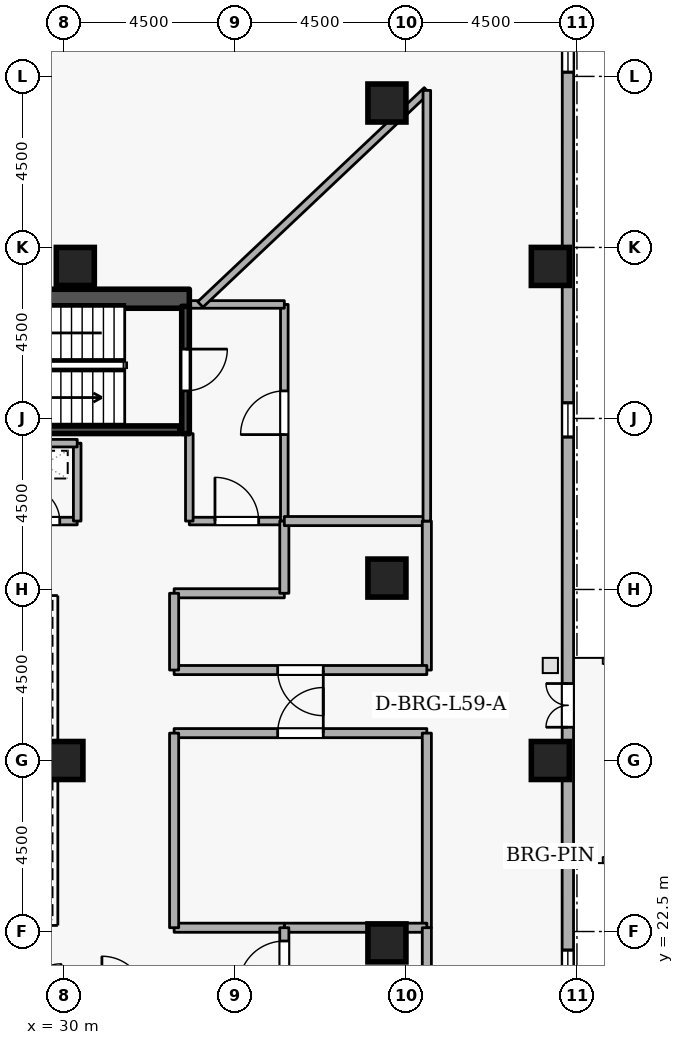
"""IFC4 building model, lengths in metres.
Left out: names, types, materials, properties, quantities, classifications, styles, units other than length and angle.
Written with IfcOpenShell. Run it as: python <this file> out.ifc"""

import sys

from ifc_helpers import new_model, si_unit, direction, frame, frame_2d, origin, origin_2d, place, context, subcontext, project, spatial, rectangle, extrude, element, fill, save


model = new_model("IFC4")
c1 = context("Model", 3, precision=1e-05, world=origin(), true_north=direction((0.0, 1.0)))
c2 = subcontext(c1, "Body", "Model", "MODEL_VIEW")
j1 = project(units=[si_unit("LENGTHUNIT", "METRE"), si_unit("PLANEANGLEUNIT", "RADIAN")], contexts=[c1])
p1 = place(None, origin())
s1 = spatial("IfcSite", under=j1, at=p1, CompositionType="ELEMENT")
p2 = place(p1, origin())
s2 = spatial("IfcBuilding", under=s1, at=p2, CompositionType="ELEMENT")
p3 = place(p2, frame((0.0, 0.0, 221.7)))
s3 = spatial("IfcBuildingStorey", under=s2, at=p3, CompositionType="ELEMENT", Elevation=221.7)
p4 = place(p3, frame((17.7, 39.15, 0.0), z_axis=(0.0, 0.0, 1.0), x_axis=(1.0, 0.0, 0.0)))
e1 = element("IfcWall", 1, at=p4, inside=s3, PredefinedType="SHEAR", context=c2, shape_type="SweptSolid", body=[
    extrude(rectangle(XDim=15.6, YDim=0.5, at=frame_2d((7.8, 0.0))), origin(), (0.0, 0.0, 1.0), 4.2),
])
for number, where, z_axis, x_axis in (
    (2, (42.8, 27.0, 0.0), (0.0, 0.0, 1.0), (1.0, 0.0, 0.0)),
    (3, (42.8, 40.0, 0.0), (0.0, 0.0, 1.0), (1.0, 0.0, 0.0)),
    (4, (38.5, 44.3, 0.0), (0.0, 0.0, 1.0), (1.0, 0.0, 0.0)),
    (5, (38.5, 22.2, 0.0), (0.0, 0.0, 1.0), (1.0, 0.0, 0.0)),
    (6, (38.5, 31.8, 0.0), (0.0, 0.0, 1.0), (1.0, 0.0, 0.0)),
    (7, (30.3, 40.0, 0.0), (0.0, 0.0, 1.0), (1.0, 0.0, 0.0)),
    (8, (30.0, 27.0, 0.0), (0.0, 0.0, 1.0), (1.0, 0.0, 0.0)),
):
    element("IfcColumn", number, at=place(p3, frame(where, z_axis=z_axis, x_axis=x_axis)), inside=s3, PredefinedType="COLUMN", context=c2, shape_type="SweptSolid", body=[
        extrude(rectangle(XDim=1.0, YDim=1.0, at=origin_2d()), origin(), (0.0, 0.0, 1.0), 4.2),
    ])
p5 = place(p3, frame((43.259, 13.612, 0.0), z_axis=(0.0, 0.0, 1.0), x_axis=(0.000169493917, 0.999999985636, 0.0)))
e9 = element("IfcWall", 9, at=p5, inside=s3, PredefinedType="STANDARD", context=c2, shape_type="SweptSolid", body=[
    extrude(rectangle(XDim=34.57, YDim=0.3, at=frame_2d((17.285, 0.0))), origin(), (0.0, 0.0, 1.0), 3.3),
])
p6 = place(p5, frame((14.263, 0.0, 0.0)))
e10 = element("IfcOpeningElement", 10, at=p6, cuts=e9, PredefinedType="OPENING", context=c2, shape_type="SweptSolid", body=[
    extrude(rectangle(XDim=1.15, YDim=2.1, at=frame_2d((0.575, 1.05))), frame((0.0, 0.16, 0.0), z_axis=(0.0, -1.0, 0.0), x_axis=(1.0, 0.0, 0.0)), (0.0, 0.0, 1.0), 0.32),
])
p7 = place(p5, frame((2.7, 0.0, 0.72)))
e11 = element("IfcOpeningElement", 11, at=p7, cuts=e9, PredefinedType="OPENING", context=c2, shape_type="SweptSolid", body=[
    extrude(rectangle(XDim=0.9, YDim=1.75, at=frame_2d((0.45, 0.875))), frame((0.0, 0.16, 0.0), z_axis=(0.0, -1.0, 0.0), x_axis=(1.0, 0.0, 0.0)), (0.0, 0.0, 1.0), 0.32),
])
p8 = place(p5, frame((7.5, 0.0, 0.72)))
e12 = element("IfcOpeningElement", 12, at=p8, cuts=e9, PredefinedType="OPENING", context=c2, shape_type="SweptSolid", body=[
    extrude(rectangle(XDim=0.9, YDim=1.75, at=frame_2d((0.45, 0.875))), frame((0.0, 0.16, 0.0), z_axis=(0.0, -1.0, 0.0), x_axis=(1.0, 0.0, 0.0)), (0.0, 0.0, 1.0), 0.32),
])
p9 = place(p5, frame((21.9, 0.0, 0.72)))
e13 = element("IfcOpeningElement", 13, at=p9, cuts=e9, PredefinedType="OPENING", context=c2, shape_type="SweptSolid", body=[
    extrude(rectangle(XDim=0.9, YDim=1.75, at=frame_2d((0.45, 0.875))), frame((0.0, 0.16, 0.0), z_axis=(0.0, -1.0, 0.0), x_axis=(1.0, 0.0, 0.0)), (0.0, 0.0, 1.0), 0.32),
])
p10 = place(p5, frame((31.5, 0.0, 0.72)))
e14 = element("IfcOpeningElement", 14, at=p10, cuts=e9, PredefinedType="OPENING", context=c2, shape_type="SweptSolid", body=[
    extrude(rectangle(XDim=0.9, YDim=1.75, at=frame_2d((0.45, 0.875))), frame((0.0, 0.16, 0.0), z_axis=(0.0, -1.0, 0.0), x_axis=(1.0, 0.0, 0.0)), (0.0, 0.0, 1.0), 0.32),
])
p11 = place(p3, frame((33.2, 38.95, 0.0), z_axis=(0.0, 0.0, 1.0), x_axis=(0.0, -1.0, 0.0)))
e15 = element("IfcWall", 15, at=p11, inside=s3, PredefinedType="SHEAR", context=c2, shape_type="SweptSolid", body=[
    extrude(rectangle(XDim=3.35, YDim=0.2, at=frame_2d((1.675, 0.0))), origin(), (0.0, 0.0, 1.0), 4.2),
])
p12 = place(p11, frame((1.125, 0.0, 0.0)))
e16 = element("IfcOpeningElement", 16, at=p12, cuts=e15, PredefinedType="OPENING", context=c2, shape_type="SweptSolid", body=[
    extrude(rectangle(XDim=1.1, YDim=2.1, at=frame_2d((0.55, 1.05))), frame((0.0, 0.11, 0.0), z_axis=(0.0, -1.0, 0.0), x_axis=(1.0, 0.0, 0.0)), (0.0, 0.0, 1.0), 0.22),
])
p13 = place(p3, frame((25.95, 35.703, 0.0), z_axis=(0.0, 0.0, 1.0), x_axis=(1.0, 0.0, 0.0)))
e17 = element("IfcWall", 17, at=p13, inside=s3, PredefinedType="SHEAR", context=c2, shape_type="SweptSolid", body=[
    extrude(rectangle(XDim=7.1, YDim=0.2, at=frame_2d((3.55, 0.0))), origin(), (0.0, 0.0, 1.0), 4.2),
])
p14 = place(p3, frame((33.3, 33.3, 0.0), z_axis=(0.0, 0.0, 1.0), x_axis=(1.0, 0.0, 0.0)))
e18 = element("IfcWall", 18, at=p14, inside=s3, PredefinedType="STANDARD", context=c2, shape_type="SweptSolid", body=[
    extrude(rectangle(XDim=2.5, YDim=0.2, at=frame_2d((1.25, 0.0))), origin(), (0.0, 0.0, 1.0), 3.94),
])
p15 = place(p14, frame((0.675, 0.0, 0.0)))
e19 = element("IfcOpeningElement", 19, at=p15, cuts=e18, PredefinedType="OPENING", context=c2, shape_type="SweptSolid", body=[
    extrude(rectangle(XDim=1.15, YDim=2.1, at=frame_2d((0.575, 1.05))), frame((0.0, 0.11, 0.0), z_axis=(0.0, -1.0, 0.0), x_axis=(1.0, 0.0, 0.0)), (0.0, 0.0, 1.0), 0.22),
])
p16 = place(p3, frame((35.8, 33.3, 0.0), z_axis=(0.0, 0.0, 1.0), x_axis=(0.0, 1.0, 0.0)))
e20 = element("IfcWall", 20, at=p16, inside=s3, PredefinedType="STANDARD", context=c2, shape_type="SweptSolid", body=[
    extrude(rectangle(XDim=5.7, YDim=0.2, at=frame_2d((2.85, 0.0))), origin(), (0.0, 0.0, 1.0), 3.94),
])
p17 = place(p16, frame((2.275, 0.0, 0.0)))
e21 = element("IfcOpeningElement", 21, at=p17, cuts=e20, PredefinedType="OPENING", context=c2, shape_type="SweptSolid", body=[
    extrude(rectangle(XDim=1.15, YDim=2.1, at=frame_2d((0.575, 1.05))), frame((0.0, 0.11, 0.0), z_axis=(0.0, -1.0, 0.0), x_axis=(1.0, 0.0, 0.0)), (0.0, 0.0, 1.0), 0.22),
])
p18 = place(p3, frame((35.8, 39.0, 0.0), z_axis=(0.0, 0.0, 1.0), x_axis=(-1.0, 0.0, 0.0)))
e22 = element("IfcWall", 22, at=p18, inside=s3, PredefinedType="STANDARD", context=c2, shape_type="SweptSolid", body=[
    extrude(rectangle(XDim=2.5, YDim=0.2, at=frame_2d((1.25, 0.0))), origin(), (0.0, 0.0, 1.0), 3.94),
])
p19 = place(p3, frame((33.3, 35.6, 0.0), z_axis=(0.0, 0.0, 1.0), x_axis=(0.0, -1.0, 0.0)))
e23 = element("IfcWall", 23, at=p19, inside=s3, PredefinedType="STANDARD", context=c2, shape_type="SweptSolid", body=[
    extrude(rectangle(XDim=2.3, YDim=0.2, at=frame_2d((1.15, 0.0))), origin(), (0.0, 0.0, 1.0), 3.145),
])
p20 = place(p3, frame((28.55, 33.3, 0.0), z_axis=(0.0, 0.0, 1.0), x_axis=(1.0, 0.0, 0.0)))
e24 = element("IfcWall", 24, at=p20, inside=s3, PredefinedType="STANDARD", context=c2, shape_type="SweptSolid", body=[
    extrude(rectangle(XDim=1.8, YDim=0.2, at=frame_2d((0.9, 0.0))), origin(), (0.0, 0.0, 1.0), 3.94),
])
p21 = place(p20, frame((0.46, 0.0, 0.0)))
e25 = element("IfcOpeningElement", 25, at=p21, cuts=e24, PredefinedType="OPENING", context=c2, shape_type="SweptSolid", body=[
    extrude(rectangle(XDim=0.88, YDim=2.04, at=frame_2d((0.44, 1.02))), frame((0.0, 0.11, 0.0), z_axis=(0.0, -1.0, 0.0), x_axis=(1.0, 0.0, 0.0)), (0.0, 0.0, 1.0), 0.22),
])
p22 = place(p3, frame((30.35, 33.3, 0.0), z_axis=(0.0, 0.0, 1.0), x_axis=(0.0, 1.0, 0.0)))
e26 = element("IfcWall", 26, at=p22, inside=s3, PredefinedType="STANDARD", context=c2, shape_type="SweptSolid", body=[
    extrude(rectangle(XDim=2.05, YDim=0.2, at=frame_2d((1.025, 0.0))), origin(), (0.0, 0.0, 1.0), 3.94),
])
p23 = place(p3, frame((30.35, 35.35, 0.0), z_axis=(0.0, 0.0, 1.0), x_axis=(-1.0, 0.0, 0.0)))
e27 = element("IfcWall", 27, at=p23, inside=s3, PredefinedType="STANDARD", context=c2, shape_type="SweptSolid", body=[
    extrude(rectangle(XDim=1.8, YDim=0.2, at=frame_2d((0.9, 0.0))), origin(), (0.0, 0.0, 1.0), 3.94),
])
p24 = place(p3, frame((32.9, 27.72, 0.0), z_axis=(0.0, 0.0, 1.0), x_axis=(1.0, 0.0, 0.0)))
e28 = element("IfcWall", 28, at=p24, inside=s3, PredefinedType="STANDARD", context=c2, shape_type="SweptSolid", body=[
    extrude(rectangle(XDim=6.65, YDim=0.24, at=frame_2d((3.325, 0.0))), origin(), (0.0, 0.0, 1.0), 3.94),
])
p25 = place(p24, frame((2.725, 0.0, 0.0)))
e29 = element("IfcOpeningElement", 29, at=p25, cuts=e28, PredefinedType="OPENING", context=c2, shape_type="SweptSolid", body=[
    extrude(rectangle(XDim=1.2, YDim=2.1, at=frame_2d((0.6, 1.05))), frame((0.0, 0.13, 0.0), z_axis=(0.0, -1.0, 0.0), x_axis=(1.0, 0.0, 0.0)), (0.0, 0.0, 1.0), 0.26),
])
p26 = place(p3, frame((39.55, 27.72, 0.0), z_axis=(0.0, 0.0, 1.0), x_axis=(0.0, -1.0, 0.0)))
e30 = element("IfcWall", 30, at=p26, inside=s3, PredefinedType="STANDARD", context=c2, shape_type="SweptSolid", body=[
    extrude(rectangle(XDim=5.12, YDim=0.24, at=frame_2d((2.56, 0.0))), origin(), (0.0, 0.0, 1.0), 3.94),
])
p27 = place(p3, frame((39.55, 22.6, 0.0), z_axis=(0.0, 0.0, 1.0), x_axis=(-1.0, 0.0, 0.0)))
e31 = element("IfcWall", 31, at=p27, inside=s3, PredefinedType="STANDARD", context=c2, shape_type="SweptSolid", body=[
    extrude(rectangle(XDim=3.75, YDim=0.24, at=frame_2d((1.875, 0.0))), origin(), (0.0, 0.0, 1.0), 3.94),
])
p28 = place(p3, frame((35.8, 22.6, 0.0), z_axis=(0.0, 0.0, 1.0), x_axis=(-1.0, 0.0, 0.0)))
e32 = element("IfcWall", 32, at=p28, inside=s3, PredefinedType="STANDARD", context=c2, shape_type="SweptSolid", body=[
    extrude(rectangle(XDim=2.9, YDim=0.24, at=frame_2d((1.45, 0.0))), origin(), (0.0, 0.0, 1.0), 3.94),
])
p29 = place(p3, frame((32.9, 22.6, 0.0), z_axis=(0.0, 0.0, 1.0), x_axis=(0.0, 1.0, 0.0)))
e33 = element("IfcWall", 33, at=p29, inside=s3, PredefinedType="STANDARD", context=c2, shape_type="SweptSolid", body=[
    extrude(rectangle(XDim=5.12, YDim=0.24, at=frame_2d((2.56, 0.0))), origin(), (0.0, 0.0, 1.0), 3.145),
])
p30 = place(p3, frame((32.9, 31.4, 0.0), z_axis=(0.0, 0.0, 1.0), x_axis=(1.0, 0.0, 0.0)))
e34 = element("IfcWall", 34, at=p30, inside=s3, PredefinedType="STANDARD", context=c2, shape_type="SweptSolid", body=[
    extrude(rectangle(XDim=2.9, YDim=0.24, at=frame_2d((1.45, 0.0))), origin(), (0.0, 0.0, 1.0), 3.94),
])
p31 = place(p3, frame((35.8, 31.4, 0.0), z_axis=(0.0, 0.0, 1.0), x_axis=(0.0, 1.0, 0.0)))
e35 = element("IfcWall", 35, at=p31, inside=s3, PredefinedType="STANDARD", context=c2, shape_type="SweptSolid", body=[
    extrude(rectangle(XDim=1.9, YDim=0.24, at=frame_2d((0.95, 0.0))), origin(), (0.0, 0.0, 1.0), 3.94),
])
p32 = place(p3, frame((35.8, 33.3, 0.0), z_axis=(0.0, 0.0, 1.0), x_axis=(1.0, 0.0, 0.0)))
e36 = element("IfcWall", 36, at=p32, inside=s3, PredefinedType="STANDARD", context=c2, shape_type="SweptSolid", body=[
    extrude(rectangle(XDim=3.75, YDim=0.24, at=frame_2d((1.875, 0.0))), origin(), (0.0, 0.0, 1.0), 3.94),
])
p33 = place(p3, frame((39.55, 33.3, 0.0), z_axis=(0.0, 0.0, 1.0), x_axis=(0.0, -1.0, 0.0)))
e37 = element("IfcWall", 37, at=p33, inside=s3, PredefinedType="STANDARD", context=c2, shape_type="SweptSolid", body=[
    extrude(rectangle(XDim=3.92, YDim=0.24, at=frame_2d((1.96, 0.0))), origin(), (0.0, 0.0, 1.0), 3.94),
])
p34 = place(p3, frame((39.55, 29.38, 0.0), z_axis=(0.0, 0.0, 1.0), x_axis=(-1.0, 0.0, 0.0)))
e38 = element("IfcWall", 38, at=p34, inside=s3, PredefinedType="STANDARD", context=c2, shape_type="SweptSolid", body=[
    extrude(rectangle(XDim=6.65, YDim=0.24, at=frame_2d((3.325, 0.0))), origin(), (0.0, 0.0, 1.0), 3.94),
])
p35 = place(p34, frame((2.725, 0.0, 0.0)))
e39 = element("IfcOpeningElement", 39, at=p35, cuts=e38, PredefinedType="OPENING", context=c2, shape_type="SweptSolid", body=[
    extrude(rectangle(XDim=1.2, YDim=2.1, at=frame_2d((0.6, 1.05))), frame((0.0, 0.13, 0.0), z_axis=(0.0, -1.0, 0.0), x_axis=(1.0, 0.0, 0.0)), (0.0, 0.0, 1.0), 0.26),
])
p36 = place(p3, frame((32.9, 29.38, 0.0), z_axis=(0.0, 0.0, 1.0), x_axis=(0.0, 1.0, 0.0)))
e40 = element("IfcWall", 40, at=p36, inside=s3, PredefinedType="STANDARD", context=c2, shape_type="SweptSolid", body=[
    extrude(rectangle(XDim=2.02, YDim=0.24, at=frame_2d((1.01, 0.0))), origin(), (0.0, 0.0, 1.0), 3.145),
])
p37 = place(p3, frame((33.59, 39.0, 0.0), z_axis=(0.0, 0.0, 1.0), x_axis=(0.72683147456, 0.686815846926, 0.0)))
e41 = element("IfcWall", 41, at=p37, inside=s3, PredefinedType="STANDARD", context=c2, shape_type="SweptSolid", body=[
    extrude(rectangle(XDim=8.2, YDim=0.2, at=frame_2d((4.1, 0.0))), origin(), (0.0, 0.0, 1.0), 3.94),
])
p38 = place(p3, frame((39.55, 44.632, 0.0), z_axis=(0.0, 0.0, 1.0), x_axis=(0.0, -1.0, 0.0)))
e42 = element("IfcWall", 42, at=p38, inside=s3, PredefinedType="STANDARD", context=c2, shape_type="SweptSolid", body=[
    extrude(rectangle(XDim=11.332, YDim=0.2, at=frame_2d((5.666, 0.0))), origin(), (0.0, 0.0, 1.0), 3.94),
])
p39 = place(p3, frame((35.8, 20.7, 0.0), z_axis=(0.0, 0.0, 1.0), x_axis=(0.0, 1.0, 0.0)))
e43 = element("IfcWall", 43, at=p39, inside=s3, PredefinedType="STANDARD", context=c2, shape_type="SweptSolid", body=[
    extrude(rectangle(XDim=1.9, YDim=0.24, at=frame_2d((0.95, 0.0))), origin(), (0.0, 0.0, 1.0), 3.94),
])
p40 = place(p39, frame((0.35, 0.0, 0.0)))
e44 = element("IfcOpeningElement", 44, at=p40, cuts=e43, PredefinedType="OPENING", context=c2, shape_type="SweptSolid", body=[
    extrude(rectangle(XDim=1.2, YDim=2.1, at=frame_2d((0.6, 1.05))), frame((0.0, 0.13, 0.0), z_axis=(0.0, -1.0, 0.0), x_axis=(1.0, 0.0, 0.0)), (0.0, 0.0, 1.0), 0.26),
])
p41 = place(p3, frame((39.55, 22.6, 0.0), z_axis=(0.0, 0.0, 1.0), x_axis=(0.0, -1.0, 0.0)))
e45 = element("IfcWall", 45, at=p41, inside=s3, PredefinedType="STANDARD", context=c2, shape_type="SweptSolid", body=[
    extrude(rectangle(XDim=7.4, YDim=0.24, at=frame_2d((3.7, 0.0))), origin(), (0.0, 0.0, 1.0), 3.94),
])
p42 = place(p6, origin())
e46 = element("IfcDoor", 46, at=p42, inside=s3, OperationType="DOUBLE_DOOR_SINGLE_SWING", PredefinedType="DOOR", context=c2, shape_type="SweptSolid", body=[
    extrude(rectangle(XDim=1.15, YDim=2.1, at=frame_2d((0.575, 1.05))), frame((0.0, 0.025, 0.0), z_axis=(0.0, -1.0, 0.0), x_axis=(1.0, 0.0, 0.0)), (0.0, 0.0, 1.0), 0.05),
])
fill(e10, e46)
p43 = place(p8, origin())
e47 = element("IfcWindow", 47, at=p43, inside=s3, PartitioningType="SINGLE_PANEL", PredefinedType="WINDOW", context=c2, shape_type="SweptSolid", body=[
    extrude(rectangle(XDim=0.9, YDim=1.75, at=frame_2d((0.45, 0.875))), frame((0.0, 0.03, 0.0), z_axis=(0.0, -1.0, 0.0), x_axis=(1.0, 0.0, 0.0)), (0.0, 0.0, 1.0), 0.06),
])
fill(e12, e47)
p44 = place(p9, origin())
e48 = element("IfcWindow", 48, at=p44, inside=s3, PartitioningType="SINGLE_PANEL", PredefinedType="WINDOW", context=c2, shape_type="SweptSolid", body=[
    extrude(rectangle(XDim=0.9, YDim=1.75, at=frame_2d((0.45, 0.875))), frame((0.0, 0.03, 0.0), z_axis=(0.0, -1.0, 0.0), x_axis=(1.0, 0.0, 0.0)), (0.0, 0.0, 1.0), 0.06),
])
fill(e13, e48)
p45 = place(p10, origin())
e49 = element("IfcWindow", 49, at=p45, inside=s3, PartitioningType="SINGLE_PANEL", PredefinedType="WINDOW", context=c2, shape_type="SweptSolid", body=[
    extrude(rectangle(XDim=0.9, YDim=1.75, at=frame_2d((0.45, 0.875))), frame((0.0, 0.03, 0.0), z_axis=(0.0, -1.0, 0.0), x_axis=(1.0, 0.0, 0.0)), (0.0, 0.0, 1.0), 0.06),
])
fill(e14, e49)
p46 = place(p12, origin())
e50 = element("IfcDoor", 50, at=p46, inside=s3, OperationType="SINGLE_SWING_LEFT", PredefinedType="DOOR", context=c2, shape_type="SweptSolid", body=[
    extrude(rectangle(XDim=1.1, YDim=2.1, at=frame_2d((0.55, 1.05))), frame((0.0, 0.025, 0.0), z_axis=(0.0, -1.0, 0.0), x_axis=(1.0, 0.0, 0.0)), (0.0, 0.0, 1.0), 0.05),
])
fill(e16, e50)
p47 = place(p15, origin())
e51 = element("IfcDoor", 51, at=p47, inside=s3, OperationType="SINGLE_SWING_LEFT", PredefinedType="DOOR", context=c2, shape_type="SweptSolid", body=[
    extrude(rectangle(XDim=1.15, YDim=2.1, at=frame_2d((0.575, 1.05))), frame((0.0, 0.025, 0.0), z_axis=(0.0, -1.0, 0.0), x_axis=(1.0, 0.0, 0.0)), (0.0, 0.0, 1.0), 0.05),
])
fill(e19, e51)
p48 = place(p21, origin())
e52 = element("IfcDoor", 52, at=p48, inside=s3, OperationType="SINGLE_SWING_LEFT", PredefinedType="DOOR", context=c2, shape_type="SweptSolid", body=[
    extrude(rectangle(XDim=0.88, YDim=2.04, at=frame_2d((0.44, 1.02))), frame((0.0, 0.025, 0.0), z_axis=(0.0, -1.0, 0.0), x_axis=(1.0, 0.0, 0.0)), (0.0, 0.0, 1.0), 0.05),
])
fill(e25, e52)
p49 = place(p25, origin())
e53 = element("IfcDoor", 53, at=p49, inside=s3, OperationType="SINGLE_SWING_RIGHT", PredefinedType="DOOR", context=c2, shape_type="SweptSolid", body=[
    extrude(rectangle(XDim=1.2, YDim=2.1, at=frame_2d((0.6, 1.05))), frame((0.0, 0.025, 0.0), z_axis=(0.0, -1.0, 0.0), x_axis=(1.0, 0.0, 0.0)), (0.0, 0.0, 1.0), 0.05),
])
fill(e29, e53)
p50 = place(p35, origin())
e54 = element("IfcDoor", 54, at=p50, inside=s3, OperationType="SINGLE_SWING_LEFT", PredefinedType="DOOR", context=c2, shape_type="SweptSolid", body=[
    extrude(rectangle(XDim=1.2, YDim=2.1, at=frame_2d((0.6, 1.05))), frame((0.0, 0.025, 0.0), z_axis=(0.0, -1.0, 0.0), x_axis=(1.0, 0.0, 0.0)), (0.0, 0.0, 1.0), 0.05),
])
fill(e39, e54)
p51 = place(p17, origin())
e55 = element("IfcDoor", 55, at=p51, inside=s3, OperationType="SINGLE_SWING_LEFT", PredefinedType="DOOR", context=c2, shape_type="SweptSolid", body=[
    extrude(rectangle(XDim=1.15, YDim=2.1, at=frame_2d((0.575, 1.05))), frame((0.0, 0.025, 0.0), z_axis=(0.0, -1.0, 0.0), x_axis=(1.0, 0.0, 0.0)), (0.0, 0.0, 1.0), 0.05),
])
fill(e21, e55)
p52 = place(p40, origin())
e56 = element("IfcDoor", 56, at=p52, inside=s3, OperationType="SINGLE_SWING_LEFT", PredefinedType="DOOR", context=c2, shape_type="SweptSolid", body=[
    extrude(rectangle(XDim=1.2, YDim=2.1, at=frame_2d((0.6, 1.05))), frame((0.0, 0.025, 0.0), z_axis=(0.0, -1.0, 0.0), x_axis=(1.0, 0.0, 0.0)), (0.0, 0.0, 1.0), 0.05),
])
fill(e44, e56)
save(model, sys.argv[1])
